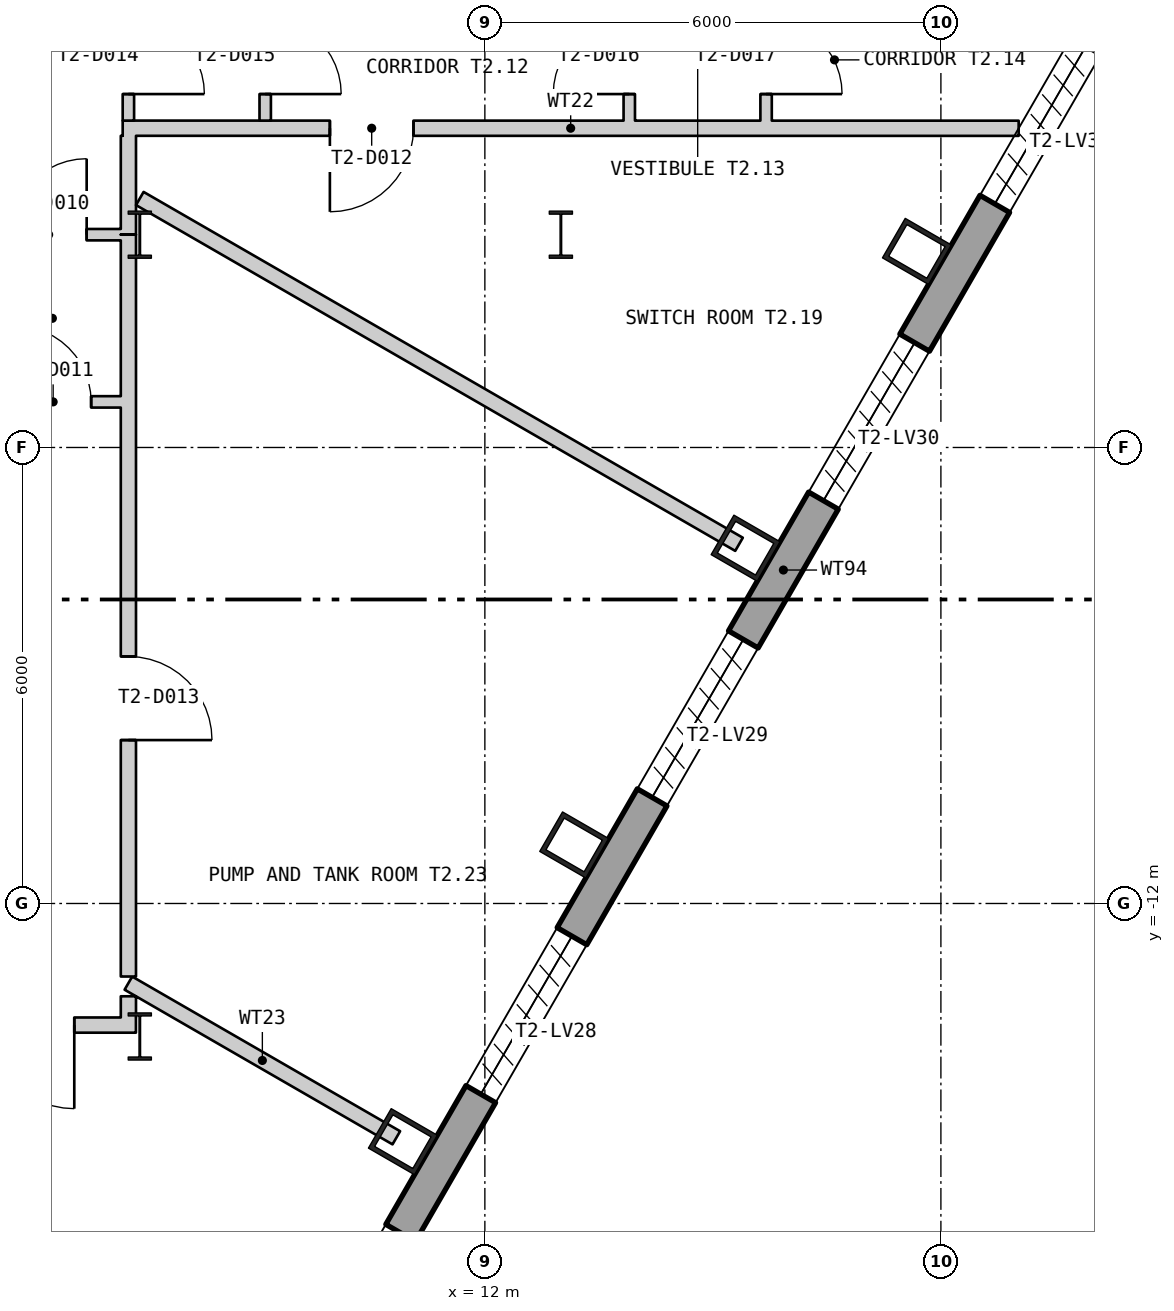
"""IFC4 building model, lengths in metres.
Left out: names, types, materials, properties, quantities, classifications, styles, units other than length and angle.
Written with IfcOpenShell. Run it as: python <this file> out.ifc"""

import sys

from ifc_helpers import new_model, si_unit, direction, frame, frame_2d, origin, origin_2d, place, context, subcontext, project, spatial, polyline, rectangle, hollow_rectangle, i_section, outline, extrude, element, fill, save


model = new_model("IFC4")
c1 = context("Model", 3, precision=1e-05, world=origin(), true_north=direction((0.0, 1.0)))
c2 = subcontext(c1, "Body", "Model", "MODEL_VIEW")
j1 = project(units=[si_unit("LENGTHUNIT", "METRE"), si_unit("PLANEANGLEUNIT", "RADIAN")], contexts=[c1])
p1 = place(None, origin())
s1 = spatial("IfcSite", under=j1, at=p1, CompositionType="ELEMENT")
p2 = place(p1, origin())
s2 = spatial("IfcBuilding", under=s1, at=p2, CompositionType="ELEMENT")
p3 = place(p2, frame((0.0, 0.0, 133.8)))
s3 = spatial("IfcBuildingStorey", under=s2, at=p3, CompositionType="ELEMENT", Elevation=133.8)
for number, where, z_axis, x_axis in (
    (1, (10.921, -15.134, 0.0), (0.0, 0.0, 1.0), (0.5, 0.866, 0.0)),
    (2, (13.175, -11.23, 0.0), (0.0, 0.0, 1.0), (0.5, 0.866, 0.0)),
    (3, (15.43, -7.325, 0.0), (0.0, 0.0, 1.0), (0.5, 0.866, 0.0)),
    (4, (17.684, -3.42, 0.0), (0.0, 0.0, 1.0), (0.5, 0.866, 0.0)),
):
    element("IfcColumn", number, at=place(p3, frame(where, z_axis=z_axis, x_axis=x_axis)), inside=s3, PredefinedType="COLUMN", context=c2, shape_type="SweptSolid", body=[
        extrude(hollow_rectangle(XDim=0.6, YDim=0.7, WallThickness=0.06, at=origin_2d()), origin(), (0.0, 0.0, 1.0), 6.0),
    ])
for number, where, z_axis, x_axis in (
    (5, (7.46, -3.2, 0.0), (0.0, 0.0, 1.0), (1.0, 0.0, 0.0)),
    (6, (7.46, -13.75, 0.0), (0.0, 0.0, 1.0), (1.0, 0.0, 0.0)),
    (7, (13.0, -3.2, 0.0), (0.0, 0.0, 1.0), (1.0, 0.0, 0.0)),
):
    element("IfcColumn", number, at=place(p3, frame(where, z_axis=z_axis, x_axis=x_axis)), inside=s3, PredefinedType="COLUMN", context=c2, shape_type="SweptSolid", body=[
        extrude(i_section(OverallWidth=0.305, OverallDepth=0.62, WebThickness=0.021, FlangeThickness=0.04, at=origin_2d()), origin(), (0.0, 0.0, 1.0), 6.0),
    ])
p4 = place(p3, frame((4.49, -27.423, -0.18), z_axis=(0.0, 0.0, 1.0), x_axis=(0.500000335318, 0.866025210188, 0.0)))
e8 = element("IfcWall", 8, at=p4, inside=s3, PredefinedType="SOLIDWALL", context=c2, shape_type="SweptSolid", body=[
    extrude(outline(polyline([(-0.13, -0.225), (45.88, -0.225), (45.62, 0.225), (0.13, 0.225), (-0.13, -0.225)])), origin(), (0.0, 0.0, 1.0), 6.0),
])
p5 = place(p4, frame((1.425, 0.0, 1.38)))
e9 = element("IfcOpeningElement", 9, at=p5, cuts=e8, PredefinedType="OPENING", context=c2, shape_type="SweptSolid", body=[
    extrude(rectangle(XDim=2.4, YDim=3.6, at=frame_2d((1.2, 1.8))), frame((0.0, 0.235, 0.0), z_axis=(0.0, -1.0, 0.0), x_axis=(1.0, 0.0, 0.0)), (0.0, 0.0, 1.0), 0.47),
])
p6 = place(p4, frame((5.895, 0.0, 1.38)))
e10 = element("IfcOpeningElement", 10, at=p6, cuts=e8, PredefinedType="OPENING", context=c2, shape_type="SweptSolid", body=[
    extrude(rectangle(XDim=2.4, YDim=3.6, at=frame_2d((1.2, 1.8))), frame((0.0, 0.235, 0.0), z_axis=(0.0, -1.0, 0.0), x_axis=(1.0, 0.0, 0.0)), (0.0, 0.0, 1.0), 0.47),
])
p7 = place(p4, frame((10.403, 0.0, 1.38)))
e11 = element("IfcOpeningElement", 11, at=p7, cuts=e8, PredefinedType="OPENING", context=c2, shape_type="SweptSolid", body=[
    extrude(rectangle(XDim=2.4, YDim=3.6, at=frame_2d((1.2, 1.8))), frame((0.0, 0.235, 0.0), z_axis=(0.0, -1.0, 0.0), x_axis=(1.0, 0.0, 0.0)), (0.0, 0.0, 1.0), 0.47),
])
p8 = place(p4, frame((14.912, 0.0, 1.38)))
e12 = element("IfcOpeningElement", 12, at=p8, cuts=e8, PredefinedType="OPENING", context=c2, shape_type="SweptSolid", body=[
    extrude(rectangle(XDim=2.4, YDim=3.6, at=frame_2d((1.2, 1.8))), frame((0.0, 0.235, 0.0), z_axis=(0.0, -1.0, 0.0), x_axis=(1.0, 0.0, 0.0)), (0.0, 0.0, 1.0), 0.47),
])
p9 = place(p4, frame((19.421, 0.0, 1.38)))
e13 = element("IfcOpeningElement", 13, at=p9, cuts=e8, PredefinedType="OPENING", context=c2, shape_type="SweptSolid", body=[
    extrude(rectangle(XDim=2.4, YDim=3.6, at=frame_2d((1.2, 1.8))), frame((0.0, 0.235, 0.0), z_axis=(0.0, -1.0, 0.0), x_axis=(1.0, 0.0, 0.0)), (0.0, 0.0, 1.0), 0.47),
])
p10 = place(p4, frame((23.929, 0.0, 1.38)))
e14 = element("IfcOpeningElement", 14, at=p10, cuts=e8, PredefinedType="OPENING", context=c2, shape_type="SweptSolid", body=[
    extrude(rectangle(XDim=2.4, YDim=3.6, at=frame_2d((1.2, 1.8))), frame((0.0, 0.235, 0.0), z_axis=(0.0, -1.0, 0.0), x_axis=(1.0, 0.0, 0.0)), (0.0, 0.0, 1.0), 0.47),
])
p11 = place(p4, frame((28.438, 0.0, 1.38)))
e15 = element("IfcOpeningElement", 15, at=p11, cuts=e8, PredefinedType="OPENING", context=c2, shape_type="SweptSolid", body=[
    extrude(rectangle(XDim=2.4, YDim=3.6, at=frame_2d((1.2, 1.8))), frame((0.0, 0.235, 0.0), z_axis=(0.0, -1.0, 0.0), x_axis=(1.0, 0.0, 0.0)), (0.0, 0.0, 1.0), 0.47),
])
p12 = place(p4, frame((32.947, 0.0, 1.38)))
e16 = element("IfcOpeningElement", 16, at=p12, cuts=e8, PredefinedType="OPENING", context=c2, shape_type="SweptSolid", body=[
    extrude(rectangle(XDim=2.4, YDim=3.6, at=frame_2d((1.2, 1.8))), frame((0.0, 0.235, 0.0), z_axis=(0.0, -1.0, 0.0), x_axis=(1.0, 0.0, 0.0)), (0.0, 0.0, 1.0), 0.47),
])
p13 = place(p4, frame((37.455, 0.0, 1.38)))
e17 = element("IfcOpeningElement", 17, at=p13, cuts=e8, PredefinedType="OPENING", context=c2, shape_type="SweptSolid", body=[
    extrude(rectangle(XDim=2.4, YDim=3.6, at=frame_2d((1.2, 1.8))), frame((0.0, 0.235, 0.0), z_axis=(0.0, -1.0, 0.0), x_axis=(1.0, 0.0, 0.0)), (0.0, 0.0, 1.0), 0.47),
])
p14 = place(p4, frame((41.925, 0.0, 1.38)))
e18 = element("IfcOpeningElement", 18, at=p14, cuts=e8, PredefinedType="OPENING", context=c2, shape_type="SweptSolid", body=[
    extrude(rectangle(XDim=2.4, YDim=3.6, at=frame_2d((1.2, 1.8))), frame((0.0, 0.235, 0.0), z_axis=(0.0, -1.0, 0.0), x_axis=(1.0, 0.0, 0.0)), (0.0, 0.0, 1.0), 0.47),
])
p15 = place(p3, frame((4.3, -13.6, 0.0), z_axis=(0.0, 0.0, 1.0), x_axis=(1.0, 0.0, 0.0)))
e19 = element("IfcWall", 19, at=p15, inside=s3, PredefinedType="PARTITIONING", context=c2, shape_type="SweptSolid", body=[
    extrude(rectangle(XDim=3.109, YDim=0.2, at=frame_2d((1.554, 0.0))), origin(), (0.0, 0.0, 1.0), 4.89),
])
p16 = place(p15, frame((1.198, 0.0, 0.0)))
e20 = element("IfcOpeningElement", 20, at=p16, cuts=e19, PredefinedType="OPENING", context=c2, shape_type="SweptSolid", body=[
    extrude(rectangle(XDim=1.1, YDim=2.1, at=frame_2d((0.55, 1.05))), frame((0.0, 0.11, 0.0), z_axis=(0.0, -1.0, 0.0), x_axis=(1.0, 0.0, 0.0)), (0.0, 0.0, 1.0), 0.22),
])
p17 = place(p3, frame((5.235, -3.2, 0.0), z_axis=(0.0, 0.0, 1.0), x_axis=(1.0, 0.0, 0.0)))
e21 = element("IfcWall", 21, at=p17, inside=s3, PredefinedType="PARTITIONING", context=c2, shape_type="SweptSolid", body=[
    extrude(rectangle(XDim=1.975, YDim=0.15, at=frame_2d((0.988, 0.0))), origin(), (0.0, 0.0, 1.0), 4.89),
])
p18 = place(p17, frame((0.526, 0.0, 0.0)))
e22 = element("IfcOpeningElement", 22, at=p18, cuts=e21, PredefinedType="OPENING", context=c2, shape_type="SweptSolid", body=[
    extrude(rectangle(XDim=1.0, YDim=2.1, at=frame_2d((0.5, 1.05))), frame((0.0, 0.085, 0.0), z_axis=(0.0, -1.0, 0.0), x_axis=(1.0, 0.0, 0.0)), (0.0, 0.0, 1.0), 0.17),
])
p19 = place(p3, frame((5.43, -5.4, 0.0), z_axis=(0.0, 0.0, 1.0), x_axis=(1.0, 0.0, 0.0)))
e23 = element("IfcWall", 23, at=p19, inside=s3, PredefinedType="PARTITIONING", context=c2, shape_type="SweptSolid", body=[
    extrude(rectangle(XDim=1.78, YDim=0.15, at=frame_2d((0.89, 0.0))), origin(), (0.0, 0.0, 1.0), 5.8),
])
p20 = place(p19, frame((0.39, 0.0, 0.0)))
e24 = element("IfcOpeningElement", 24, at=p20, cuts=e23, PredefinedType="OPENING", context=c2, shape_type="SweptSolid", body=[
    extrude(rectangle(XDim=1.0, YDim=2.1, at=frame_2d((0.5, 1.05))), frame((0.0, 0.085, 0.0), z_axis=(0.0, -1.0, 0.0), x_axis=(1.0, 0.0, 0.0)), (0.0, 0.0, 1.0), 0.17),
])
p21 = place(p3, frame((7.235, -1.799, 0.0), z_axis=(0.0, 0.0, 1.0), x_axis=(0.999999996402, -8.4832032e-05, 0.0)))
e25 = element("IfcWall", 25, at=p21, inside=s3, PredefinedType="PARTITIONING", context=c2, shape_type="SweptSolid", body=[
    extrude(rectangle(XDim=11.788, YDim=0.2, at=frame_2d((5.894, 0.0))), origin(), (0.0, 0.0, 1.0), 5.8),
])
p22 = place(p21, frame((2.726, 0.0, 0.0)))
e26 = element("IfcOpeningElement", 26, at=p22, cuts=e25, PredefinedType="OPENING", context=c2, shape_type="SweptSolid", body=[
    extrude(rectangle(XDim=1.1, YDim=2.1, at=frame_2d((0.55, 1.05))), frame((0.0, 0.11, 0.0), z_axis=(0.0, -1.0, 0.0), x_axis=(1.0, 0.0, 0.0)), (0.0, 0.0, 1.0), 0.22),
])
p23 = place(p3, frame((7.31, -13.5, 0.0), z_axis=(0.0, 0.0, 1.0), x_axis=(0.0, 1.0, 0.0)))
e27 = element("IfcWall", 27, at=p23, inside=s3, PredefinedType="PARTITIONING", context=c2, shape_type="SweptSolid", body=[
    extrude(rectangle(XDim=0.279, YDim=0.2, at=frame_2d((0.14, 0.0))), origin(), (0.0, 0.0, 1.0), 5.8),
])
p24 = place(p3, frame((7.31, -13.048, 0.0), z_axis=(0.0, 0.0, 1.0), x_axis=(0.866042392862, -0.4999705729, 0.0)))
e28 = element("IfcWall", 28, at=p24, inside=s3, PredefinedType="PARTITIONING", context=c2, shape_type="SweptSolid", body=[
    extrude(rectangle(XDim=4.07, YDim=0.2, at=frame_2d((2.035, 0.0))), origin(), (0.0, 0.0, 1.0), 5.8),
])
p25 = place(p3, frame((7.31, -12.961, 0.0), z_axis=(0.0, 0.0, 1.0), x_axis=(0.0, 1.0, 0.0)))
e29 = element("IfcWall", 29, at=p25, inside=s3, PredefinedType="PARTITIONING", context=c2, shape_type="SweptSolid", body=[
    extrude(rectangle(XDim=9.761, YDim=0.2, at=frame_2d((4.88, 0.0))), origin(), (0.0, 0.0, 1.0), 5.21),
])
p26 = place(p25, frame((3.111, 0.0, 0.0)))
e30 = element("IfcOpeningElement", 30, at=p26, cuts=e29, PredefinedType="OPENING", context=c2, shape_type="SweptSolid", body=[
    extrude(rectangle(XDim=1.1, YDim=2.1, at=frame_2d((0.55, 1.05))), frame((0.0, 0.11, 0.0), z_axis=(0.0, -1.0, 0.0), x_axis=(1.0, 0.0, 0.0)), (0.0, 0.0, 1.0), 0.22),
])
p27 = place(p3, frame((7.31, -3.2, 0.0), z_axis=(0.0, 0.0, 1.0), x_axis=(0.0, 1.0, 0.0)))
e31 = element("IfcWall", 31, at=p27, inside=s3, PredefinedType="PARTITIONING", context=c2, shape_type="SweptSolid", body=[
    extrude(rectangle(XDim=1.301, YDim=0.2, at=frame_2d((0.65, 0.0))), origin(), (0.0, 0.0, 1.0), 5.8),
])
p28 = place(p3, frame((7.31, -1.699, 0.0), z_axis=(0.0, 0.0, 1.0), x_axis=(0.0, 1.0, 0.0)))
e32 = element("IfcWall", 32, at=p28, inside=s3, PredefinedType="PARTITIONING", context=c2, shape_type="SweptSolid", body=[
    extrude(rectangle(XDim=1.698, YDim=0.15, at=frame_2d((0.849, 0.0))), origin(), (0.0, 0.0, 1.0), 5.8),
])
p29 = place(p28, frame((0.349, 0.0, 0.0)))
e33 = element("IfcOpeningElement", 33, at=p29, cuts=e32, PredefinedType="OPENING", context=c2, shape_type="SweptSolid", body=[
    extrude(rectangle(XDim=1.0, YDim=2.1, at=frame_2d((0.5, 1.05))), frame((0.0, 0.085, 0.0), z_axis=(0.0, -1.0, 0.0), x_axis=(1.0, 0.0, 0.0)), (0.0, 0.0, 1.0), 0.17),
])
p30 = place(p3, frame((7.46, -2.724, 0.0), z_axis=(0.0, 0.0, 1.0), x_axis=(0.866112420066, -0.499849253082, 0.0)))
e34 = element("IfcWall", 34, at=p30, inside=s3, PredefinedType="PARTITIONING", context=c2, shape_type="SweptSolid", body=[
    extrude(rectangle(XDim=9.103, YDim=0.2, at=frame_2d((4.551, 0.0))), origin(), (0.0, 0.0, 1.0), 5.8),
])
p31 = place(p3, frame((9.11, -1.699, 0.0), z_axis=(0.0, 0.0, 1.0), x_axis=(0.0, 1.0, 0.0)))
e35 = element("IfcWall", 35, at=p31, inside=s3, PredefinedType="PARTITIONING", context=c2, shape_type="SweptSolid", body=[
    extrude(rectangle(XDim=1.698, YDim=0.15, at=frame_2d((0.849, 0.0))), origin(), (0.0, 0.0, 1.0), 5.8),
])
p32 = place(p31, frame((0.349, 0.0, 0.0)))
e36 = element("IfcOpeningElement", 36, at=p32, cuts=e35, PredefinedType="OPENING", context=c2, shape_type="SweptSolid", body=[
    extrude(rectangle(XDim=1.0, YDim=2.1, at=frame_2d((0.5, 1.05))), frame((0.0, 0.085, 0.0), z_axis=(0.0, -1.0, 0.0), x_axis=(1.0, 0.0, 0.0)), (0.0, 0.0, 1.0), 0.17),
])
p33 = place(p3, frame((13.9, -1.7, 0.0), z_axis=(0.0, 0.0, 1.0), x_axis=(0.0, 1.0, 0.0)))
e37 = element("IfcWall", 37, at=p33, inside=s3, PredefinedType="PARTITIONING", context=c2, shape_type="SweptSolid", body=[
    extrude(rectangle(XDim=1.7, YDim=0.15, at=frame_2d((0.85, 0.0))), origin(), (0.0, 0.0, 1.0), 5.8),
])
p34 = place(p33, frame((0.35, 0.0, 0.0)))
e38 = element("IfcOpeningElement", 38, at=p34, cuts=e37, PredefinedType="OPENING", context=c2, shape_type="SweptSolid", body=[
    extrude(rectangle(XDim=1.0, YDim=2.1, at=frame_2d((0.5, 1.05))), frame((0.0, 0.085, 0.0), z_axis=(0.0, -1.0, 0.0), x_axis=(1.0, 0.0, 0.0)), (0.0, 0.0, 1.0), 0.17),
])
p35 = place(p3, frame((15.7, -1.7, 0.0), z_axis=(0.0, 0.0, 1.0), x_axis=(0.0, 1.0, 0.0)))
e39 = element("IfcWall", 39, at=p35, inside=s3, PredefinedType="PARTITIONING", context=c2, shape_type="SweptSolid", body=[
    extrude(rectangle(XDim=1.7, YDim=0.15, at=frame_2d((0.85, 0.0))), origin(), (0.0, 0.0, 1.0), 5.8),
])
p36 = place(p35, frame((0.35, 0.0, 0.0)))
e40 = element("IfcOpeningElement", 40, at=p36, cuts=e39, PredefinedType="OPENING", context=c2, shape_type="SweptSolid", body=[
    extrude(rectangle(XDim=1.0, YDim=2.1, at=frame_2d((0.5, 1.05))), frame((0.0, 0.085, 0.0), z_axis=(0.0, -1.0, 0.0), x_axis=(1.0, 0.0, 0.0)), (0.0, 0.0, 1.0), 0.17),
])
p37 = place(p16, origin())
e41 = element("IfcDoor", 41, at=p37, inside=s3, OperationType="SINGLE_SWING_RIGHT", PredefinedType="DOOR", context=c2, shape_type="SweptSolid", body=[
    extrude(rectangle(XDim=1.1, YDim=2.1, at=frame_2d((0.55, 1.05))), frame((0.0, 0.025, 0.0), z_axis=(0.0, -1.0, 0.0), x_axis=(1.0, 0.0, 0.0)), (0.0, 0.0, 1.0), 0.05),
])
fill(e20, e41)
p38 = place(p18, origin())
e42 = element("IfcDoor", 42, at=p38, inside=s3, OperationType="SINGLE_SWING_LEFT", PredefinedType="DOOR", context=c2, shape_type="SweptSolid", body=[
    extrude(rectangle(XDim=1.0, YDim=2.1, at=frame_2d((0.5, 1.05))), frame((0.0, 0.025, 0.0), z_axis=(0.0, -1.0, 0.0), x_axis=(1.0, 0.0, 0.0)), (0.0, 0.0, 1.0), 0.05),
])
fill(e22, e42)
p39 = place(p20, origin())
e43 = element("IfcDoor", 43, at=p39, inside=s3, OperationType="SINGLE_SWING_RIGHT", PredefinedType="DOOR", context=c2, shape_type="SweptSolid", body=[
    extrude(rectangle(XDim=1.0, YDim=2.1, at=frame_2d((0.5, 1.05))), frame((0.0, 0.025, 0.0), z_axis=(0.0, -1.0, 0.0), x_axis=(1.0, 0.0, 0.0)), (0.0, 0.0, 1.0), 0.05),
])
fill(e24, e43)
p40 = place(p22, origin())
e44 = element("IfcDoor", 44, at=p40, inside=s3, OperationType="SINGLE_SWING_LEFT", PredefinedType="DOOR", context=c2, shape_type="SweptSolid", body=[
    extrude(rectangle(XDim=1.1, YDim=2.1, at=frame_2d((0.55, 1.05))), frame((0.0, 0.025, 0.0), z_axis=(0.0, -1.0, 0.0), x_axis=(1.0, 0.0, 0.0)), (0.0, 0.0, 1.0), 0.05),
])
fill(e26, e44)
p41 = place(p26, origin())
e45 = element("IfcDoor", 45, at=p41, inside=s3, OperationType="SINGLE_SWING_LEFT", PredefinedType="DOOR", context=c2, shape_type="SweptSolid", body=[
    extrude(rectangle(XDim=1.1, YDim=2.1, at=frame_2d((0.55, 1.05))), frame((0.0, 0.025, 0.0), z_axis=(0.0, -1.0, 0.0), x_axis=(1.0, 0.0, 0.0)), (0.0, 0.0, 1.0), 0.05),
])
fill(e30, e45)
p42 = place(p29, origin())
e46 = element("IfcDoor", 46, at=p42, inside=s3, OperationType="SINGLE_SWING_LEFT", PredefinedType="DOOR", context=c2, shape_type="SweptSolid", body=[
    extrude(rectangle(XDim=1.0, YDim=2.1, at=frame_2d((0.5, 1.05))), frame((0.0, 0.025, 0.0), z_axis=(0.0, -1.0, 0.0), x_axis=(1.0, 0.0, 0.0)), (0.0, 0.0, 1.0), 0.05),
])
fill(e33, e46)
p43 = place(p32, origin())
e47 = element("IfcDoor", 47, at=p43, inside=s3, OperationType="SINGLE_SWING_LEFT", PredefinedType="DOOR", context=c2, shape_type="SweptSolid", body=[
    extrude(rectangle(XDim=1.0, YDim=2.1, at=frame_2d((0.5, 1.05))), frame((0.0, 0.025, 0.0), z_axis=(0.0, -1.0, 0.0), x_axis=(1.0, 0.0, 0.0)), (0.0, 0.0, 1.0), 0.05),
])
fill(e36, e47)
p44 = place(p34, origin())
e48 = element("IfcDoor", 48, at=p44, inside=s3, OperationType="SINGLE_SWING_RIGHT", PredefinedType="DOOR", context=c2, shape_type="SweptSolid", body=[
    extrude(rectangle(XDim=1.0, YDim=2.1, at=frame_2d((0.5, 1.05))), frame((0.0, 0.025, 0.0), z_axis=(0.0, -1.0, 0.0), x_axis=(1.0, 0.0, 0.0)), (0.0, 0.0, 1.0), 0.05),
])
fill(e38, e48)
p45 = place(p36, origin())
e49 = element("IfcDoor", 49, at=p45, inside=s3, OperationType="SINGLE_SWING_LEFT", PredefinedType="DOOR", context=c2, shape_type="SweptSolid", body=[
    extrude(rectangle(XDim=1.0, YDim=2.1, at=frame_2d((0.5, 1.05))), frame((0.0, 0.025, 0.0), z_axis=(0.0, -1.0, 0.0), x_axis=(1.0, 0.0, 0.0)), (0.0, 0.0, 1.0), 0.05),
])
fill(e40, e49)
save(model, sys.argv[1])
